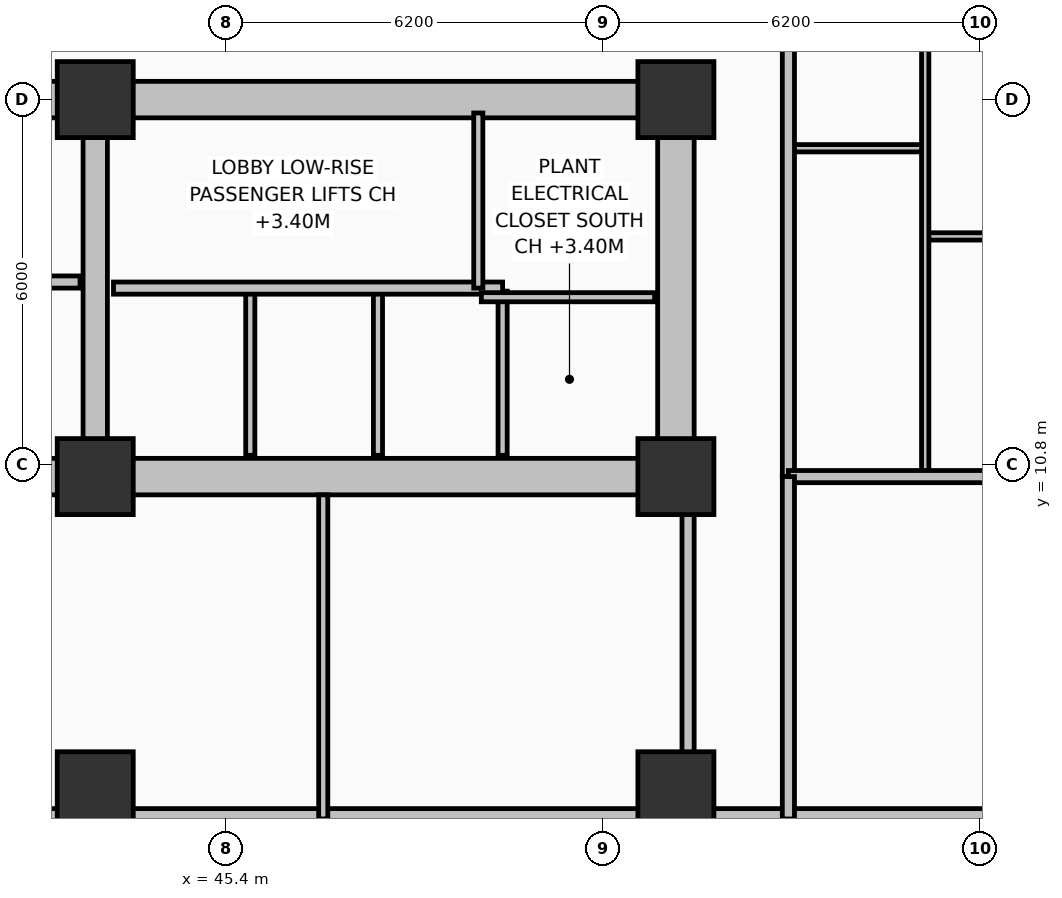
"""IFC4 building model, lengths in metres.
Left out: names, types, materials, properties, quantities, classifications, styles, units other than length and angle.
Written with IfcOpenShell. Run it as: python <this file> out.ifc"""

import sys

from ifc_helpers import new_model, si_unit, direction, frame, frame_2d, origin, origin_2d, place, context, subcontext, project, spatial, rectangle, extrude, element, fill, save


model = new_model("IFC4")
c1 = context("Model", 3, precision=1e-05, world=origin(), true_north=direction((0.0, 1.0)))
c2 = subcontext(c1, "Body", "Model", "MODEL_VIEW")
j1 = project(units=[si_unit("LENGTHUNIT", "METRE"), si_unit("PLANEANGLEUNIT", "RADIAN")], contexts=[c1])
p1 = place(None, origin())
s1 = spatial("IfcSite", under=j1, at=p1, CompositionType="ELEMENT")
p2 = place(p1, origin())
s2 = spatial("IfcBuilding", under=s1, at=p2, CompositionType="ELEMENT")
p3 = place(p2, frame((0.0, 0.0, 36.2)))
s3 = spatial("IfcBuildingStorey", under=s2, at=p3, CompositionType="ELEMENT", Elevation=36.2)
p4 = place(p3, frame((52.8, 10.6, 0.0), z_axis=(0.0, 0.0, 1.0), x_axis=(-1.0, 0.0, 0.0)))
e1 = element("IfcWall", 1, at=p4, inside=s3, PredefinedType="SHEAR", context=c2, shape_type="SweptSolid", body=[
    extrude(rectangle(XDim=27.2, YDim=0.6, at=frame_2d((13.6, 0.0))), origin(), (0.0, 0.0, 1.0), 3.7),
])
p5 = place(p3, frame((52.8, 10.9, 0.0), z_axis=(0.0, 0.0, 1.0), x_axis=(0.0, 1.0, 0.0)))
e2 = element("IfcWall", 2, at=p5, inside=s3, PredefinedType="SHEAR", context=c2, shape_type="SweptSolid", body=[
    extrude(rectangle(XDim=5.6, YDim=0.6, at=frame_2d((2.8, 0.0))), origin(), (0.0, 0.0, 1.0), 3.7),
])
p6 = place(p3, frame((25.6, 16.8, 0.0), z_axis=(0.0, 0.0, 1.0), x_axis=(1.0, 0.0, 0.0)))
e3 = element("IfcWall", 3, at=p6, inside=s3, PredefinedType="SHEAR", context=c2, shape_type="SweptSolid", body=[
    extrude(rectangle(XDim=27.2, YDim=0.6, at=frame_2d((13.6, 0.0))), origin(), (0.0, 0.0, 1.0), 3.7),
])
p7 = place(p6, frame((1.7, 0.0, 0.0)))
e4 = element("IfcOpeningElement", 4, at=p7, cuts=e3, PredefinedType="OPENING", context=c2, shape_type="SweptSolid", body=[
    extrude(rectangle(XDim=1.1, YDim=2.15, at=frame_2d((0.55, 1.075))), frame((0.0, 0.31, 0.0), z_axis=(0.0, -1.0, 0.0), x_axis=(1.0, 0.0, 0.0)), (0.0, 0.0, 1.0), 0.62),
])
p8 = place(p6, frame((4.45, 0.0, 0.0)))
e5 = element("IfcOpeningElement", 5, at=p8, cuts=e3, PredefinedType="OPENING", context=c2, shape_type="SweptSolid", body=[
    extrude(rectangle(XDim=0.85, YDim=2.1, at=frame_2d((0.425, 1.05))), frame((0.0, 0.31, 0.0), z_axis=(0.0, -1.0, 0.0), x_axis=(1.0, 0.0, 0.0)), (0.0, 0.0, 1.0), 0.62),
])
p9 = place(p6, frame((6.5, 0.0, 0.0)))
e6 = element("IfcOpeningElement", 6, at=p9, cuts=e3, PredefinedType="OPENING", context=c2, shape_type="SweptSolid", body=[
    extrude(rectangle(XDim=0.85, YDim=2.1, at=frame_2d((0.425, 1.05))), frame((0.0, 0.31, 0.0), z_axis=(0.0, -1.0, 0.0), x_axis=(1.0, 0.0, 0.0)), (0.0, 0.0, 1.0), 0.62),
])
p10 = place(p6, frame((13.0, 0.0, 0.0)))
e7 = element("IfcOpeningElement", 7, at=p10, cuts=e3, PredefinedType="OPENING", context=c2, shape_type="SweptSolid", body=[
    extrude(rectangle(XDim=1.2, YDim=2.15, at=frame_2d((0.6, 1.075))), frame((0.0, 0.31, 0.0), z_axis=(0.0, -1.0, 0.0), x_axis=(1.0, 0.0, 0.0)), (0.0, 0.0, 1.0), 0.62),
])
p11 = place(p6, frame((20.4, 0.0, 0.0)))
e8 = element("IfcOpeningElement", 8, at=p11, cuts=e3, PredefinedType="OPENING", context=c2, shape_type="SweptSolid", body=[
    extrude(rectangle(XDim=1.3, YDim=2.2, at=frame_2d((0.65, 1.1))), frame((0.0, 0.31, 0.0), z_axis=(0.0, -1.0, 0.0), x_axis=(1.0, 0.0, 0.0)), (0.0, 0.0, 1.0), 0.62),
])
p12 = place(p6, frame((24.65, 0.0, 0.0)))
e9 = element("IfcOpeningElement", 9, at=p12, cuts=e3, PredefinedType="OPENING", context=c2, shape_type="SweptSolid", body=[
    extrude(rectangle(XDim=0.85, YDim=2.1, at=frame_2d((0.425, 1.05))), frame((0.0, 0.31, 0.0), z_axis=(0.0, -1.0, 0.0), x_axis=(1.0, 0.0, 0.0)), (0.0, 0.0, 1.0), 0.62),
])
p13 = place(p3, frame((43.25, 10.9, 0.0), z_axis=(0.0, 0.0, 1.0), x_axis=(0.0, 1.0, 0.0)))
e10 = element("IfcWall", 10, at=p13, inside=s3, PredefinedType="SHEAR", context=c2, shape_type="SweptSolid", body=[
    extrude(rectangle(XDim=5.6, YDim=0.4, at=frame_2d((2.8, 0.0))), origin(), (0.0, 0.0, 1.0), 3.7),
])
for number, where, z_axis, x_axis in (
    (11, (43.25, 10.6, 0.0), (0.0, 0.0, 1.0), (1.0, 0.0, 0.0)),
    (12, (43.25, 16.8, 0.0), (0.0, 0.0, 1.0), (1.0, 0.0, 0.0)),
    (13, (52.8, 10.6, 0.0), (0.0, 0.0, 1.0), (1.0, 0.0, 0.0)),
    (14, (52.8, 16.8, 0.0), (0.0, 0.0, 1.0), (1.0, 0.0, 0.0)),
    (15, (43.25, 5.45, 0.0), (0.0, 0.0, 1.0), (1.0, 0.0, 0.0)),
    (16, (52.8, 5.45, 0.0), (0.0, 0.0, 1.0), (1.0, 0.0, 0.0)),
):
    element("IfcColumn", number, at=place(p3, frame(where, z_axis=z_axis, x_axis=x_axis)), inside=s3, PredefinedType="COLUMN", context=c2, shape_type="SweptSolid", body=[
        extrude(rectangle(XDim=1.25, YDim=1.25, at=origin_2d()), origin(), (0.0, 0.0, 1.0), 3.7),
    ])
p14 = place(p3, frame((42.4, 4.97, 0.0), z_axis=(0.0, 0.0, 1.0), x_axis=(1.0, 0.0, 0.0)))
e17 = element("IfcWall", 17, at=p14, inside=s3, PredefinedType="SOLIDWALL", context=c2, shape_type="SweptSolid", body=[
    extrude(rectangle(XDim=17.4, YDim=0.34, at=frame_2d((8.7, 0.0))), origin(), (0.0, 0.0, 1.0), 2.7),
])
p15 = place(p14, frame((2.06, 0.0, 0.93)))
e18 = element("IfcOpeningElement", 18, at=p15, cuts=e17, PredefinedType="OPENING", context=c2, shape_type="SweptSolid", body=[
    extrude(rectangle(XDim=1.1, YDim=1.65, at=frame_2d((0.55, 0.825))), frame((0.0, 0.18, 0.0), z_axis=(0.0, -1.0, 0.0), x_axis=(1.0, 0.0, 0.0)), (0.0, 0.0, 1.0), 0.36),
])
p16 = place(p14, frame((5.28, 0.0, 0.93)))
e19 = element("IfcOpeningElement", 19, at=p16, cuts=e17, PredefinedType="OPENING", context=c2, shape_type="SweptSolid", body=[
    extrude(rectangle(XDim=1.1, YDim=1.65, at=frame_2d((0.55, 0.825))), frame((0.0, 0.18, 0.0), z_axis=(0.0, -1.0, 0.0), x_axis=(1.0, 0.0, 0.0)), (0.0, 0.0, 1.0), 0.36),
])
p17 = place(p14, frame((7.8, 0.0, 0.93)))
e20 = element("IfcOpeningElement", 20, at=p17, cuts=e17, PredefinedType="OPENING", context=c2, shape_type="SweptSolid", body=[
    extrude(rectangle(XDim=1.1, YDim=1.65, at=frame_2d((0.55, 0.825))), frame((0.0, 0.18, 0.0), z_axis=(0.0, -1.0, 0.0), x_axis=(1.0, 0.0, 0.0)), (0.0, 0.0, 1.0), 0.36),
])
p18 = place(p14, frame((14.59, 0.0, 0.93)))
e21 = element("IfcOpeningElement", 21, at=p18, cuts=e17, PredefinedType="OPENING", context=c2, shape_type="SweptSolid", body=[
    extrude(rectangle(XDim=1.1, YDim=1.65, at=frame_2d((0.55, 0.825))), frame((0.0, 0.18, 0.0), z_axis=(0.0, -1.0, 0.0), x_axis=(1.0, 0.0, 0.0)), (0.0, 0.0, 1.0), 0.36),
])
p19 = place(p3, frame((35.4, 13.8, 0.0), z_axis=(0.0, 0.0, 1.0), x_axis=(1.0, 0.0, 0.0)))
e22 = element("IfcWall", 22, at=p19, inside=s3, PredefinedType="PARTITIONING", context=c2, shape_type="SweptSolid", body=[
    extrude(rectangle(XDim=7.6, YDim=0.2, at=frame_2d((3.8, 0.0))), origin(), (0.0, 0.0, 1.0), 2.3),
])
p20 = place(p19, frame((0.7, 0.0, 0.0)))
e23 = element("IfcOpeningElement", 23, at=p20, cuts=e22, PredefinedType="OPENING", context=c2, shape_type="SweptSolid", body=[
    extrude(rectangle(XDim=1.1, YDim=2.15, at=frame_2d((0.55, 1.075))), frame((0.0, 0.11, 0.0), z_axis=(0.0, -1.0, 0.0), x_axis=(1.0, 0.0, 0.0)), (0.0, 0.0, 1.0), 0.22),
])
p21 = place(p19, frame((3.35, 0.0, 0.0)))
e24 = element("IfcOpeningElement", 24, at=p21, cuts=e22, PredefinedType="OPENING", context=c2, shape_type="SweptSolid", body=[
    extrude(rectangle(XDim=1.2, YDim=2.15, at=frame_2d((0.6, 1.075))), frame((0.0, 0.11, 0.0), z_axis=(0.0, -1.0, 0.0), x_axis=(1.0, 0.0, 0.0)), (0.0, 0.0, 1.0), 0.22),
])
for number, where, z_axis, x_axis in (
    (25, (45.8, 10.95, 0.0), (0.0, 0.0, 1.0), (0.0, 1.0, 0.0)),
    (26, (47.9, 10.95, 0.0), (0.0, 0.0, 1.0), (0.0, 1.0, 0.0)),
    (27, (49.95, 10.95, 0.0), (0.0, 0.0, 1.0), (0.0, 1.0, 0.0)),
):
    element("IfcWall", number, at=place(p3, frame(where, z_axis=z_axis, x_axis=x_axis)), inside=s3, PredefinedType="PARTITIONING", context=c2, shape_type="SweptSolid", body=[
        extrude(rectangle(XDim=2.7, YDim=0.15, at=frame_2d((1.35, 0.0))), origin(), (0.0, 0.0, 1.0), 2.53),
    ])
p22 = place(p3, frame((43.55, 13.7, 0.0), z_axis=(0.0, 0.0, 1.0), x_axis=(1.0, 0.0, 0.0)))
e28 = element("IfcWall", 28, at=p22, inside=s3, PredefinedType="PARTITIONING", context=c2, shape_type="SweptSolid", body=[
    extrude(rectangle(XDim=6.4, YDim=0.2, at=frame_2d((3.2, 0.0))), origin(), (0.0, 0.0, 1.0), 2.53),
])
p23 = place(p22, frame((0.7, 0.0, 0.0)))
e29 = element("IfcOpeningElement", 29, at=p23, cuts=e28, PredefinedType="OPENING", context=c2, shape_type="SweptSolid", body=[
    extrude(rectangle(XDim=1.0, YDim=2.15, at=frame_2d((0.5, 1.075))), frame((0.0, 0.11, 0.0), z_axis=(0.0, -1.0, 0.0), x_axis=(1.0, 0.0, 0.0)), (0.0, 0.0, 1.0), 0.22),
])
p24 = place(p22, frame((2.8, 0.0, 0.0)))
e30 = element("IfcOpeningElement", 30, at=p24, cuts=e28, PredefinedType="OPENING", context=c2, shape_type="SweptSolid", body=[
    extrude(rectangle(XDim=1.0, YDim=2.15, at=frame_2d((0.5, 1.075))), frame((0.0, 0.11, 0.0), z_axis=(0.0, -1.0, 0.0), x_axis=(1.0, 0.0, 0.0)), (0.0, 0.0, 1.0), 0.22),
])
p25 = place(p22, frame((4.9, 0.0, 0.0)))
e31 = element("IfcOpeningElement", 31, at=p25, cuts=e28, PredefinedType="OPENING", context=c2, shape_type="SweptSolid", body=[
    extrude(rectangle(XDim=1.0, YDim=2.15, at=frame_2d((0.5, 1.075))), frame((0.0, 0.11, 0.0), z_axis=(0.0, -1.0, 0.0), x_axis=(1.0, 0.0, 0.0)), (0.0, 0.0, 1.0), 0.22),
])
p26 = place(p3, frame((49.55, 13.7, 0.0), z_axis=(0.0, 0.0, 1.0), x_axis=(0.0, 1.0, 0.0)))
e32 = element("IfcWall", 32, at=p26, inside=s3, PredefinedType="PARTITIONING", context=c2, shape_type="SweptSolid", body=[
    extrude(rectangle(XDim=2.88, YDim=0.15, at=frame_2d((1.44, 0.0))), origin(), (0.0, 0.0, 1.0), 2.53),
])
p27 = place(p3, frame((49.6, 13.55, 0.0), z_axis=(0.0, 0.0, 1.0), x_axis=(1.0, 0.0, 0.0)))
e33 = element("IfcWall", 33, at=p27, inside=s3, PredefinedType="PARTITIONING", context=c2, shape_type="SweptSolid", body=[
    extrude(rectangle(XDim=2.85, YDim=0.15, at=frame_2d((1.425, 0.0))), origin(), (0.0, 0.0, 1.0), 2.53),
])
p28 = place(p27, frame((0.9, 0.0, 0.0)))
e34 = element("IfcOpeningElement", 34, at=p28, cuts=e33, PredefinedType="OPENING", context=c2, shape_type="SweptSolid", body=[
    extrude(rectangle(XDim=0.85, YDim=2.1, at=frame_2d((0.425, 1.05))), frame((0.0, 0.085, 0.0), z_axis=(0.0, -1.0, 0.0), x_axis=(1.0, 0.0, 0.0)), (0.0, 0.0, 1.0), 0.17),
])
p29 = place(p3, frame((54.65, 16.0, 0.0), z_axis=(0.0, 0.0, 1.0), x_axis=(1.0, 0.0, 0.0)))
e35 = element("IfcWall", 35, at=p29, inside=s3, PredefinedType="PARTITIONING", context=c2, shape_type="SweptSolid", body=[
    extrude(rectangle(XDim=2.25, YDim=0.12, at=frame_2d((1.125, 0.0))), origin(), (0.0, 0.0, 1.0), 2.53),
])
p30 = place(p29, frame((0.6, 0.0, 0.0)))
e36 = element("IfcOpeningElement", 36, at=p30, cuts=e35, PredefinedType="OPENING", context=c2, shape_type="SweptSolid", body=[
    extrude(rectangle(XDim=0.85, YDim=2.1, at=frame_2d((0.425, 1.05))), frame((0.0, 0.07, 0.0), z_axis=(0.0, -1.0, 0.0), x_axis=(1.0, 0.0, 0.0)), (0.0, 0.0, 1.0), 0.14),
])
p31 = place(p3, frame((56.9, 14.55, 0.0), z_axis=(0.0, 0.0, 1.0), x_axis=(1.0, 0.0, 0.0)))
e37 = element("IfcWall", 37, at=p31, inside=s3, PredefinedType="PARTITIONING", context=c2, shape_type="SweptSolid", body=[
    extrude(rectangle(XDim=6.93, YDim=0.12, at=frame_2d((3.465, 0.0))), origin(), (0.0, 0.0, 1.0), 2.53),
])
p32 = place(p31, frame((0.45, 0.0, 0.0)))
e38 = element("IfcOpeningElement", 38, at=p32, cuts=e37, PredefinedType="OPENING", context=c2, shape_type="SweptSolid", body=[
    extrude(rectangle(XDim=0.9, YDim=2.1, at=frame_2d((0.45, 1.05))), frame((0.0, 0.07, 0.0), z_axis=(0.0, -1.0, 0.0), x_axis=(1.0, 0.0, 0.0)), (0.0, 0.0, 1.0), 0.14),
])
p33 = place(p3, frame((56.9, 10.64, 0.0), z_axis=(0.0, 0.0, 1.0), x_axis=(0.0, 1.0, 0.0)))
e39 = element("IfcWall", 39, at=p33, inside=s3, PredefinedType="PARTITIONING", context=c2, shape_type="SweptSolid", body=[
    extrude(rectangle(XDim=15.92, YDim=0.12, at=frame_2d((7.96, 0.0))), origin(), (0.0, 0.0, 1.0), 2.53),
])
p34 = place(p33, frame((0.41, 0.0, 0.0)))
e40 = element("IfcOpeningElement", 40, at=p34, cuts=e39, PredefinedType="OPENING", context=c2, shape_type="SweptSolid", body=[
    extrude(rectangle(XDim=0.9, YDim=2.1, at=frame_2d((0.45, 1.05))), frame((0.0, 0.07, 0.0), z_axis=(0.0, -1.0, 0.0), x_axis=(1.0, 0.0, 0.0)), (0.0, 0.0, 1.0), 0.14),
])
p35 = place(p33, frame((13.125, 0.0, 0.0)))
e41 = element("IfcOpeningElement", 41, at=p35, cuts=e39, PredefinedType="OPENING", context=c2, shape_type="SweptSolid", body=[
    extrude(rectangle(XDim=0.82, YDim=2.08, at=frame_2d((0.41, 1.04))), frame((0.0, 0.07, 0.0), z_axis=(0.0, -1.0, 0.0), x_axis=(1.0, 0.0, 0.0)), (0.0, 0.0, 1.0), 0.14),
])
p36 = place(p3, frame((54.65, 10.6, 0.0), z_axis=(0.0, 0.0, 1.0), x_axis=(0.0, 1.0, 0.0)))
e42 = element("IfcWall", 42, at=p36, inside=s3, PredefinedType="PARTITIONING", context=c2, shape_type="SweptSolid", body=[
    extrude(rectangle(XDim=35.2, YDim=0.2, at=frame_2d((17.6, 0.0))), origin(), (0.0, 0.0, 1.0), 2.53),
])
p37 = place(p36, frame((2.65, 0.0, 0.0)))
e43 = element("IfcOpeningElement", 43, at=p37, cuts=e42, PredefinedType="OPENING", context=c2, shape_type="SweptSolid", body=[
    extrude(rectangle(XDim=1.0, YDim=2.15, at=frame_2d((0.5, 1.075))), frame((0.0, 0.11, 0.0), z_axis=(0.0, -1.0, 0.0), x_axis=(1.0, 0.0, 0.0)), (0.0, 0.0, 1.0), 0.22),
])
p38 = place(p36, frame((19.95, 0.0, 0.0)))
e44 = element("IfcOpeningElement", 44, at=p38, cuts=e42, PredefinedType="OPENING", context=c2, shape_type="SweptSolid", body=[
    extrude(rectangle(XDim=1.0, YDim=2.15, at=frame_2d((0.5, 1.075))), frame((0.0, 0.11, 0.0), z_axis=(0.0, -1.0, 0.0), x_axis=(1.0, 0.0, 0.0)), (0.0, 0.0, 1.0), 0.22),
])
p39 = place(p3, frame((54.65, 10.6, 0.0), z_axis=(0.0, 0.0, 1.0), x_axis=(1.0, 0.0, 0.0)))
e45 = element("IfcWall", 45, at=p39, inside=s3, PredefinedType="PARTITIONING", context=c2, shape_type="SweptSolid", body=[
    extrude(rectangle(XDim=8.76, YDim=0.2, at=frame_2d((4.38, 0.0))), origin(), (0.0, 0.0, 1.0), 2.53),
])
p40 = place(p3, frame((54.65, 4.97, 0.0), z_axis=(0.0, 0.0, 1.0), x_axis=(0.0, 1.0, 0.0)))
e46 = element("IfcWall", 46, at=p40, inside=s3, PredefinedType="PARTITIONING", context=c2, shape_type="SweptSolid", body=[
    extrude(rectangle(XDim=5.63, YDim=0.2, at=frame_2d((2.815, 0.0))), origin(), (0.0, 0.0, 1.0), 2.53),
])
p41 = place(p3, frame((47.0, 4.97, 0.0), z_axis=(0.0, 0.0, 1.0), x_axis=(0.0, 1.0, 0.0)))
e47 = element("IfcWall", 47, at=p41, inside=s3, PredefinedType="PARTITIONING", context=c2, shape_type="SweptSolid", body=[
    extrude(rectangle(XDim=5.33, YDim=0.15, at=frame_2d((2.665, 0.0))), origin(), (0.0, 0.0, 1.0), 2.53),
])
p42 = place(p41, frame((1.6, 0.0, 0.0)))
e48 = element("IfcOpeningElement", 48, at=p42, cuts=e47, PredefinedType="OPENING", context=c2, shape_type="SweptSolid", body=[
    extrude(rectangle(XDim=0.9, YDim=2.1, at=frame_2d((0.45, 1.05))), frame((0.0, 0.085, 0.0), z_axis=(0.0, -1.0, 0.0), x_axis=(1.0, 0.0, 0.0)), (0.0, 0.0, 1.0), 0.17),
])
p43 = place(p3, frame((53.0, 5.92, 0.0), z_axis=(0.0, 0.0, 1.0), x_axis=(0.0, 1.0, 0.0)))
e49 = element("IfcWall", 49, at=p43, inside=s3, PredefinedType="PARTITIONING", context=c2, shape_type="SweptSolid", body=[
    extrude(rectangle(XDim=4.38, YDim=0.2, at=frame_2d((2.19, 0.0))), origin(), (0.0, 0.0, 1.0), 2.53),
])
p44 = place(p43, frame((0.85, 0.0, 0.0)))
e50 = element("IfcOpeningElement", 50, at=p44, cuts=e49, PredefinedType="OPENING", context=c2, shape_type="SweptSolid", body=[
    extrude(rectangle(XDim=0.9, YDim=2.1, at=frame_2d((0.45, 1.05))), frame((0.0, 0.11, 0.0), z_axis=(0.0, -1.0, 0.0), x_axis=(1.0, 0.0, 0.0)), (0.0, 0.0, 1.0), 0.22),
])
p45 = place(p15, origin())
e51 = element("IfcWindow", 51, at=p45, inside=s3, PartitioningType="SINGLE_PANEL", PredefinedType="WINDOW", context=c2, shape_type="SweptSolid", body=[
    extrude(rectangle(XDim=1.1, YDim=1.65, at=frame_2d((0.55, 0.825))), frame((0.0, 0.03, 0.0), z_axis=(0.0, -1.0, 0.0), x_axis=(1.0, 0.0, 0.0)), (0.0, 0.0, 1.0), 0.06),
])
fill(e18, e51)
p46 = place(p16, origin())
e52 = element("IfcWindow", 52, at=p46, inside=s3, PartitioningType="SINGLE_PANEL", PredefinedType="WINDOW", context=c2, shape_type="SweptSolid", body=[
    extrude(rectangle(XDim=1.1, YDim=1.65, at=frame_2d((0.55, 0.825))), frame((0.0, 0.03, 0.0), z_axis=(0.0, -1.0, 0.0), x_axis=(1.0, 0.0, 0.0)), (0.0, 0.0, 1.0), 0.06),
])
fill(e19, e52)
p47 = place(p17, origin())
e53 = element("IfcWindow", 53, at=p47, inside=s3, PartitioningType="SINGLE_PANEL", PredefinedType="WINDOW", context=c2, shape_type="SweptSolid", body=[
    extrude(rectangle(XDim=1.1, YDim=1.65, at=frame_2d((0.55, 0.825))), frame((0.0, 0.03, 0.0), z_axis=(0.0, -1.0, 0.0), x_axis=(1.0, 0.0, 0.0)), (0.0, 0.0, 1.0), 0.06),
])
fill(e20, e53)
p48 = place(p18, origin())
e54 = element("IfcWindow", 54, at=p48, inside=s3, PartitioningType="SINGLE_PANEL", PredefinedType="WINDOW", context=c2, shape_type="SweptSolid", body=[
    extrude(rectangle(XDim=1.1, YDim=1.65, at=frame_2d((0.55, 0.825))), frame((0.0, 0.03, 0.0), z_axis=(0.0, -1.0, 0.0), x_axis=(1.0, 0.0, 0.0)), (0.0, 0.0, 1.0), 0.06),
])
fill(e21, e54)
p49 = place(p23, origin())
e55 = element("IfcDoor", 55, at=p49, inside=s3, OperationType="SLIDING_TO_LEFT", PredefinedType="DOOR", context=c2, shape_type="SweptSolid", body=[
    extrude(rectangle(XDim=1.0, YDim=2.15, at=frame_2d((0.5, 1.075))), frame((0.0, 0.025, 0.0), z_axis=(0.0, -1.0, 0.0), x_axis=(1.0, 0.0, 0.0)), (0.0, 0.0, 1.0), 0.05),
])
fill(e29, e55)
p50 = place(p24, origin())
e56 = element("IfcDoor", 56, at=p50, inside=s3, OperationType="SLIDING_TO_LEFT", PredefinedType="DOOR", context=c2, shape_type="SweptSolid", body=[
    extrude(rectangle(XDim=1.0, YDim=2.15, at=frame_2d((0.5, 1.075))), frame((0.0, 0.025, 0.0), z_axis=(0.0, -1.0, 0.0), x_axis=(1.0, 0.0, 0.0)), (0.0, 0.0, 1.0), 0.05),
])
fill(e30, e56)
p51 = place(p25, origin())
e57 = element("IfcDoor", 57, at=p51, inside=s3, OperationType="SLIDING_TO_LEFT", PredefinedType="DOOR", context=c2, shape_type="SweptSolid", body=[
    extrude(rectangle(XDim=1.0, YDim=2.15, at=frame_2d((0.5, 1.075))), frame((0.0, 0.025, 0.0), z_axis=(0.0, -1.0, 0.0), x_axis=(1.0, 0.0, 0.0)), (0.0, 0.0, 1.0), 0.05),
])
fill(e31, e57)
p52 = place(p28, origin())
e58 = element("IfcDoor", 58, at=p52, inside=s3, OperationType="SINGLE_SWING_LEFT", PredefinedType="DOOR", context=c2, shape_type="SweptSolid", body=[
    extrude(rectangle(XDim=0.85, YDim=2.1, at=frame_2d((0.425, 1.05))), frame((0.0, 0.025, 0.0), z_axis=(0.0, -1.0, 0.0), x_axis=(1.0, 0.0, 0.0)), (0.0, 0.0, 1.0), 0.05),
])
fill(e34, e58)
p53 = place(p30, origin())
e59 = element("IfcDoor", 59, at=p53, inside=s3, OperationType="SINGLE_SWING_RIGHT", PredefinedType="DOOR", context=c2, shape_type="SweptSolid", body=[
    extrude(rectangle(XDim=0.85, YDim=2.1, at=frame_2d((0.425, 1.05))), frame((0.0, 0.025, 0.0), z_axis=(0.0, -1.0, 0.0), x_axis=(1.0, 0.0, 0.0)), (0.0, 0.0, 1.0), 0.05),
])
fill(e36, e59)
p54 = place(p32, origin())
e60 = element("IfcDoor", 60, at=p54, inside=s3, OperationType="SINGLE_SWING_RIGHT", PredefinedType="DOOR", context=c2, shape_type="SweptSolid", body=[
    extrude(rectangle(XDim=0.9, YDim=2.1, at=frame_2d((0.45, 1.05))), frame((0.0, 0.025, 0.0), z_axis=(0.0, -1.0, 0.0), x_axis=(1.0, 0.0, 0.0)), (0.0, 0.0, 1.0), 0.05),
])
fill(e38, e60)
p55 = place(p34, origin())
e61 = element("IfcDoor", 61, at=p55, inside=s3, OperationType="SINGLE_SWING_LEFT", PredefinedType="DOOR", context=c2, shape_type="SweptSolid", body=[
    extrude(rectangle(XDim=0.9, YDim=2.1, at=frame_2d((0.45, 1.05))), frame((0.0, 0.025, 0.0), z_axis=(0.0, -1.0, 0.0), x_axis=(1.0, 0.0, 0.0)), (0.0, 0.0, 1.0), 0.05),
])
fill(e40, e61)
p56 = place(p37, origin())
e62 = element("IfcDoor", 62, at=p56, inside=s3, OperationType="SINGLE_SWING_RIGHT", PredefinedType="DOOR", context=c2, shape_type="SweptSolid", body=[
    extrude(rectangle(XDim=1.0, YDim=2.15, at=frame_2d((0.5, 1.075))), frame((0.0, 0.025, 0.0), z_axis=(0.0, -1.0, 0.0), x_axis=(1.0, 0.0, 0.0)), (0.0, 0.0, 1.0), 0.05),
])
fill(e43, e62)
p57 = place(p42, origin())
e63 = element("IfcDoor", 63, at=p57, inside=s3, OperationType="SINGLE_SWING_LEFT", PredefinedType="DOOR", context=c2, shape_type="SweptSolid", body=[
    extrude(rectangle(XDim=0.9, YDim=2.1, at=frame_2d((0.45, 1.05))), frame((0.0, 0.025, 0.0), z_axis=(0.0, -1.0, 0.0), x_axis=(1.0, 0.0, 0.0)), (0.0, 0.0, 1.0), 0.05),
])
fill(e48, e63)
p58 = place(p44, origin())
e64 = element("IfcDoor", 64, at=p58, inside=s3, OperationType="SINGLE_SWING_RIGHT", PredefinedType="DOOR", context=c2, shape_type="SweptSolid", body=[
    extrude(rectangle(XDim=0.9, YDim=2.1, at=frame_2d((0.45, 1.05))), frame((0.0, 0.025, 0.0), z_axis=(0.0, -1.0, 0.0), x_axis=(1.0, 0.0, 0.0)), (0.0, 0.0, 1.0), 0.05),
])
fill(e50, e64)
p59 = place(p11, origin())
e65 = element("IfcDoor", 65, at=p59, inside=s3, OperationType="SINGLE_SWING_RIGHT", PredefinedType="DOOR", context=c2, shape_type="SweptSolid", body=[
    extrude(rectangle(XDim=1.3, YDim=2.2, at=frame_2d((0.65, 1.1))), frame((0.0, 0.025, 0.0), z_axis=(0.0, -1.0, 0.0), x_axis=(1.0, 0.0, 0.0)), (0.0, 0.0, 1.0), 0.05),
])
fill(e8, e65)
p60 = place(p12, origin())
e66 = element("IfcDoor", 66, at=p60, inside=s3, OperationType="SINGLE_SWING_LEFT", PredefinedType="DOOR", context=c2, shape_type="SweptSolid", body=[
    extrude(rectangle(XDim=0.85, YDim=2.1, at=frame_2d((0.425, 1.05))), frame((0.0, 0.025, 0.0), z_axis=(0.0, -1.0, 0.0), x_axis=(1.0, 0.0, 0.0)), (0.0, 0.0, 1.0), 0.05),
])
fill(e9, e66)
save(model, sys.argv[1])
